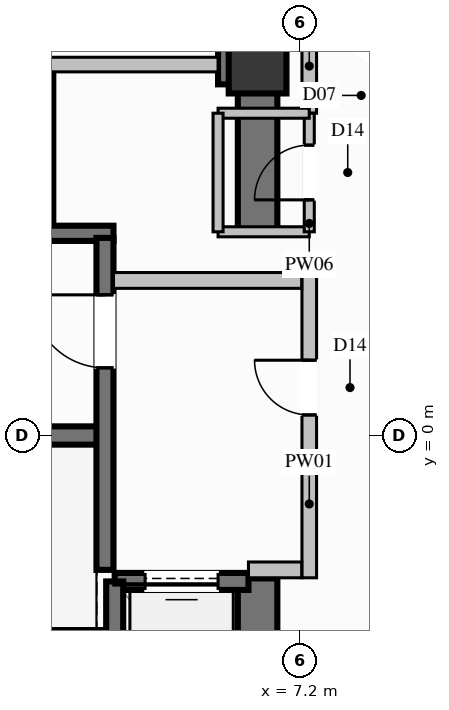
"""IFC4 building model, lengths in metres.
Left out: names, types, materials, properties, quantities, classifications, styles, units other than length and angle.
Written with IfcOpenShell. Run it as: python <this file> out.ifc"""

import sys

from ifc_helpers import new_model, si_unit, direction, frame, frame_2d, origin, origin_2d, place, context, subcontext, project, spatial, rectangle, extrude, element, fill, save


model = new_model("IFC4")
c1 = context("Model", 3, precision=1e-05, world=origin(), true_north=direction((0.0, 1.0)))
c2 = subcontext(c1, "Body", "Model", "MODEL_VIEW")
j1 = project(units=[si_unit("LENGTHUNIT", "METRE"), si_unit("PLANEANGLEUNIT", "RADIAN")], contexts=[c1])
p1 = place(None, origin())
s1 = spatial("IfcSite", under=j1, at=p1, CompositionType="ELEMENT")
p2 = place(p1, origin())
s2 = spatial("IfcBuilding", under=s1, at=p2, CompositionType="ELEMENT")
p3 = place(p2, frame((0.0, 0.0, 160.2)))
s3 = spatial("IfcBuildingStorey", under=s2, at=p3, CompositionType="ELEMENT", Elevation=160.2)
p4 = place(p3, frame((6.5, 6.1, 0.0), z_axis=(0.0, 0.0, 1.0), x_axis=(1.0, 0.0, 0.0)))
e1 = element("IfcColumn", 1, at=p4, inside=s3, PredefinedType="COLUMN", context=c2, shape_type="SweptSolid", body=[
    extrude(rectangle(XDim=0.95, YDim=0.95, at=origin_2d()), origin(), (0.0, 0.0, 1.0), 3.6),
])
p5 = place(p3, frame((-3.99, 0.0, 0.0), z_axis=(0.0, 0.0, 1.0), x_axis=(1.0, 0.0, 0.0)))
e2 = element("IfcWall", 2, at=p5, inside=s3, PredefinedType="SHEAR", context=c2, shape_type="SweptSolid", body=[
    extrude(rectangle(XDim=7.98, YDim=0.3, at=frame_2d((3.99, 0.0))), origin(), (0.0, 0.0, 1.0), 3.6),
])
for number, where, z_axis, x_axis in (
    (3, (-4.13, -3.325, 0.0), (0.0, 0.0, 1.0), (1.0, 0.0, 0.0)),
    (4, (-4.13, 3.325, 0.0), (0.0, 0.0, 1.0), (1.0, 0.0, 0.0)),
):
    element("IfcWall", number, at=place(p3, frame(where, z_axis=z_axis, x_axis=x_axis)), inside=s3, PredefinedType="SOLIDWALL", context=c2, shape_type="SweptSolid", body=[
        extrude(rectangle(XDim=8.26, YDim=0.25, at=frame_2d((4.13, 0.0))), origin(), (0.0, 0.0, 1.0), 3.6),
    ])
p6 = place(p3, frame((5.85, 6.1, 0.0), z_axis=(0.0, 0.0, 1.0), x_axis=(1.0, 0.0, 0.0)))
e5 = element("IfcWall", 5, at=p6, inside=s3, PredefinedType="SHEAR", context=c2, shape_type="SweptSolid", body=[
    extrude(rectangle(XDim=0.325, YDim=0.65, at=frame_2d((0.163, 0.0))), origin(), (0.0, 0.0, 1.0), 3.6),
])
p7 = place(p3, frame((6.5, -6.425, 0.0), z_axis=(0.0, 0.0, 1.0), x_axis=(0.0, 1.0, 0.0)))
e6 = element("IfcWall", 6, at=p7, inside=s3, PredefinedType="SHEAR", context=c2, shape_type="SweptSolid", body=[
    extrude(rectangle(XDim=4.075, YDim=0.65, at=frame_2d((2.038, 0.0))), origin(), (0.0, 0.0, 1.0), 3.6),
])
p8 = place(p3, frame((6.5, 3.35, 0.0), z_axis=(0.0, 0.0, 1.0), x_axis=(0.0, 1.0, 0.0)))
e7 = element("IfcWall", 7, at=p8, inside=s3, PredefinedType="SHEAR", context=c2, shape_type="SweptSolid", body=[
    extrude(rectangle(XDim=3.075, YDim=0.65, at=frame_2d((1.538, 0.0))), origin(), (0.0, 0.0, 1.0), 3.6),
])
p9 = place(p3, frame((3.0, 3.5, 0.0), z_axis=(0.0, 0.0, 1.0), x_axis=(0.0, 1.0, 0.0)))
e8 = element("IfcWall", 8, at=p9, inside=s3, PredefinedType="SOLIDWALL", context=c2, shape_type="SweptSolid", body=[
    extrude(rectangle(XDim=2.5, YDim=0.28, at=frame_2d((1.25, 0.0))), origin(), (0.0, 0.0, 1.0), 3.2),
])
p10 = place(p3, frame((6.35, -2.4, 0.0), z_axis=(0.0, 0.0, 1.0), x_axis=(-1.0, 0.0, 0.0)))
e9 = element("IfcWall", 9, at=p10, inside=s3, PredefinedType="SOLIDWALL", context=c2, shape_type="SweptSolid", body=[
    extrude(rectangle(XDim=2.2, YDim=0.28, at=frame_2d((1.1, 0.0))), origin(), (0.0, 0.0, 1.0), 3.2),
])
p11 = place(p10, frame((0.5, 0.0, 0.0)))
e10 = element("IfcOpeningElement", 10, at=p11, cuts=e9, PredefinedType="OPENING", context=c2, shape_type="SweptSolid", body=[
    extrude(rectangle(XDim=1.2, YDim=2.2, at=frame_2d((0.6, 1.1))), frame((0.0, 0.15, 0.0), z_axis=(0.0, -1.0, 0.0), x_axis=(1.0, 0.0, 0.0)), (0.0, 0.0, 1.0), 0.3),
])
p12 = place(p3, frame((4.15, -2.4, 0.0), z_axis=(0.0, 0.0, 1.0), x_axis=(0.0, -1.0, 0.0)))
e11 = element("IfcWall", 11, at=p12, inside=s3, PredefinedType="SOLIDWALL", context=c2, shape_type="SweptSolid", body=[
    extrude(rectangle(XDim=2.7, YDim=0.28, at=frame_2d((1.35, 0.0))), origin(), (0.0, 0.0, 1.0), 3.2),
])
p13 = place(p3, frame((3.99, -2.21, 0.0), z_axis=(0.0, 0.0, 1.0), x_axis=(0.0, 1.0, 0.0)))
e12 = element("IfcWall", 12, at=p13, inside=s3, PredefinedType="SOLIDWALL", context=c2, shape_type="SweptSolid", body=[
    extrude(rectangle(XDim=5.46, YDim=0.28, at=frame_2d((2.73, 0.0))), origin(), (0.0, 0.0, 1.0), 3.2),
])
p14 = place(p13, frame((3.323, 0.0, 0.0)))
e13 = element("IfcOpeningElement", 13, at=p14, cuts=e12, PredefinedType="OPENING", context=c2, shape_type="SweptSolid", body=[
    extrude(rectangle(XDim=1.2, YDim=2.2, at=frame_2d((0.6, 1.1))), frame((0.0, 0.15, 0.0), z_axis=(0.0, -1.0, 0.0), x_axis=(1.0, 0.0, 0.0)), (0.0, 0.0, 1.0), 0.3),
])
p15 = place(p3, frame((7.35, -2.34, 0.0), z_axis=(0.0, 0.0, 1.0), x_axis=(0.0, 1.0, 0.0)))
e14 = element("IfcWall", 14, at=p15, inside=s3, PredefinedType="PARTITIONING", context=c2, shape_type="SweptSolid", body=[
    extrude(rectangle(XDim=5.02, YDim=0.24, at=frame_2d((2.51, 0.0))), origin(), (0.0, 0.0, 1.0), 3.2),
])
p16 = place(p15, frame((2.678, 0.0, 0.0)))
e15 = element("IfcOpeningElement", 15, at=p16, cuts=e14, PredefinedType="OPENING", context=c2, shape_type="SweptSolid", body=[
    extrude(rectangle(XDim=0.9, YDim=2.02, at=frame_2d((0.45, 1.01))), frame((0.0, 0.13, 0.0), z_axis=(0.0, -1.0, 0.0), x_axis=(1.0, 0.0, 0.0)), (0.0, 0.0, 1.0), 0.26),
])
p17 = place(p3, frame((6.35, -2.21, 0.0), z_axis=(0.0, 0.0, 1.0), x_axis=(1.0, 0.0, 0.0)))
e16 = element("IfcWall", 16, at=p17, inside=s3, PredefinedType="PARTITIONING", context=c2, shape_type="SweptSolid", body=[
    extrude(rectangle(XDim=0.875, YDim=0.26, at=frame_2d((0.438, 0.0))), origin(), (0.0, 0.0, 1.0), 3.2),
])
p18 = place(p3, frame((4.13, 2.55, 0.0), z_axis=(0.0, 0.0, 1.0), x_axis=(1.0, 0.0, 0.0)))
e17 = element("IfcWall", 17, at=p18, inside=s3, PredefinedType="PARTITIONING", context=c2, shape_type="SweptSolid", body=[
    extrude(rectangle(XDim=3.095, YDim=0.26, at=frame_2d((1.548, 0.0))), origin(), (0.0, 0.0, 1.0), 3.2),
])
p19 = place(p3, frame((7.35, 5.3, 0.0), z_axis=(0.0, 0.0, 1.0), x_axis=(0.0, 1.0, 0.0)))
e18 = element("IfcWall", 18, at=p19, inside=s3, PredefinedType="PARTITIONING", context=c2, shape_type="SweptSolid", body=[
    extrude(rectangle(XDim=1.55, YDim=0.24, at=frame_2d((0.775, 0.0))), origin(), (0.0, 0.0, 1.0), 3.2),
])
p20 = place(p3, frame((3.0, 6.1, 0.0), z_axis=(0.0, 0.0, 1.0), x_axis=(1.0, 0.0, 0.0)))
e19 = element("IfcWall", 19, at=p20, inside=s3, PredefinedType="PARTITIONING", context=c2, shape_type="SweptSolid", body=[
    extrude(rectangle(XDim=2.85, YDim=0.24, at=frame_2d((1.425, 0.0))), origin(), (0.0, 0.0, 1.0), 2.067),
])
p21 = place(p3, frame((5.85, 3.35, 0.0), z_axis=(0.0, 0.0, 1.0), x_axis=(1.0, 0.0, 0.0)))
e20 = element("IfcWall", 20, at=p21, inside=s3, PredefinedType="PARTITIONING", context=c2, shape_type="SweptSolid", body=[
    extrude(rectangle(XDim=1.5, YDim=0.165, at=frame_2d((0.75, 0.0))), origin(), (0.0, 0.0, 1.0), 3.2),
])
p22 = place(p3, frame((7.35, 3.35, 0.0), z_axis=(0.0, 0.0, 1.0), x_axis=(0.0, 1.0, 0.0)))
e21 = element("IfcWall", 21, at=p22, inside=s3, PredefinedType="PARTITIONING", context=c2, shape_type="SweptSolid", body=[
    extrude(rectangle(XDim=1.95, YDim=0.165, at=frame_2d((0.975, 0.0))), origin(), (0.0, 0.0, 1.0), 3.2),
])
p23 = place(p22, frame((0.525, 0.0, 0.0)))
e22 = element("IfcOpeningElement", 22, at=p23, cuts=e21, PredefinedType="OPENING", context=c2, shape_type="SweptSolid", body=[
    extrude(rectangle(XDim=0.9, YDim=2.02, at=frame_2d((0.45, 1.01))), frame((0.0, 0.093, 0.0), z_axis=(0.0, -1.0, 0.0), x_axis=(1.0, 0.0, 0.0)), (0.0, 0.0, 1.0), 0.185),
])
p24 = place(p3, frame((7.35, 5.3, 0.0), z_axis=(0.0, 0.0, 1.0), x_axis=(-1.0, 0.0, 0.0)))
e23 = element("IfcWall", 23, at=p24, inside=s3, PredefinedType="PARTITIONING", context=c2, shape_type="SweptSolid", body=[
    extrude(rectangle(XDim=1.5, YDim=0.165, at=frame_2d((0.75, 0.0))), origin(), (0.0, 0.0, 1.0), 3.2),
])
p25 = place(p3, frame((5.85, 5.3, 0.0), z_axis=(0.0, 0.0, 1.0), x_axis=(0.0, -1.0, 0.0)))
e24 = element("IfcWall", 24, at=p25, inside=s3, PredefinedType="PARTITIONING", context=c2, shape_type="SweptSolid", body=[
    extrude(rectangle(XDim=1.95, YDim=0.165, at=frame_2d((0.975, 0.0))), origin(), (0.0, 0.0, 1.0), 2.067),
])
p26 = place(p3, frame((7.35, 6.85, 0.0), z_axis=(0.0, 0.0, 1.0), x_axis=(0.868892391395, -0.495001022398, 0.0)))
e25 = element("IfcWall", 25, at=p26, inside=s3, PredefinedType="PARTITIONING", context=c2, shape_type="SweptSolid", body=[
    extrude(rectangle(XDim=2.728, YDim=0.24, at=frame_2d((1.364, 0.0))), origin(), (0.0, 0.0, 1.0), 3.2),
])
p27 = place(p26, frame((0.864, 0.0, 0.0)))
e26 = element("IfcOpeningElement", 26, at=p27, cuts=e25, PredefinedType="OPENING", context=c2, shape_type="SweptSolid", body=[
    extrude(rectangle(XDim=1.0, YDim=2.2, at=frame_2d((0.5, 1.1))), frame((0.0, 0.13, 0.0), z_axis=(0.0, -1.0, 0.0), x_axis=(1.0, 0.0, 0.0)), (0.0, 0.0, 1.0), 0.26),
])
p28 = place(p11, origin())
e27 = element("IfcDoor", 27, at=p28, inside=s3, OperationType="SLIDING_TO_LEFT", PredefinedType="DOOR", context=c2, shape_type="SweptSolid", body=[
    extrude(rectangle(XDim=1.2, YDim=2.2, at=frame_2d((0.6, 1.1))), frame((0.0, 0.025, 0.0), z_axis=(0.0, -1.0, 0.0), x_axis=(1.0, 0.0, 0.0)), (0.0, 0.0, 1.0), 0.05),
])
fill(e10, e27)
p29 = place(p14, origin())
e28 = element("IfcDoor", 28, at=p29, inside=s3, OperationType="SINGLE_SWING_RIGHT", PredefinedType="DOOR", context=c2, shape_type="SweptSolid", body=[
    extrude(rectangle(XDim=1.2, YDim=2.2, at=frame_2d((0.6, 1.1))), frame((0.0, 0.025, 0.0), z_axis=(0.0, -1.0, 0.0), x_axis=(1.0, 0.0, 0.0)), (0.0, 0.0, 1.0), 0.05),
])
fill(e13, e28)
p30 = place(p16, origin())
e29 = element("IfcDoor", 29, at=p30, inside=s3, OperationType="SINGLE_SWING_RIGHT", PredefinedType="DOOR", context=c2, shape_type="SweptSolid", body=[
    extrude(rectangle(XDim=0.9, YDim=2.02, at=frame_2d((0.45, 1.01))), frame((0.0, 0.025, 0.0), z_axis=(0.0, -1.0, 0.0), x_axis=(1.0, 0.0, 0.0)), (0.0, 0.0, 1.0), 0.05),
])
fill(e15, e29)
p31 = place(p23, origin())
e30 = element("IfcDoor", 30, at=p31, inside=s3, OperationType="SINGLE_SWING_LEFT", PredefinedType="DOOR", context=c2, shape_type="SweptSolid", body=[
    extrude(rectangle(XDim=0.9, YDim=2.02, at=frame_2d((0.45, 1.01))), frame((0.0, 0.025, 0.0), z_axis=(0.0, -1.0, 0.0), x_axis=(1.0, 0.0, 0.0)), (0.0, 0.0, 1.0), 0.05),
])
fill(e22, e30)
p32 = place(p27, origin())
e31 = element("IfcDoor", 31, at=p32, inside=s3, OperationType="SINGLE_SWING_RIGHT", PredefinedType="DOOR", context=c2, shape_type="SweptSolid", body=[
    extrude(rectangle(XDim=1.0, YDim=2.2, at=frame_2d((0.5, 1.1))), frame((0.0, 0.025, 0.0), z_axis=(0.0, -1.0, 0.0), x_axis=(1.0, 0.0, 0.0)), (0.0, 0.0, 1.0), 0.05),
])
fill(e26, e31)
save(model, sys.argv[1])
